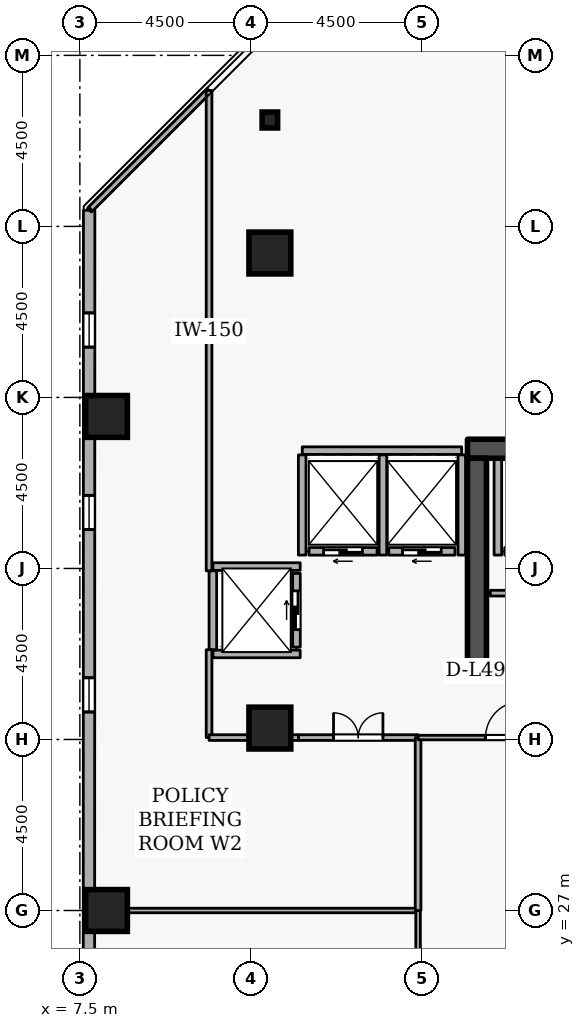
"""IFC4 building model, lengths in metres.
Left out: names, types, materials, properties, quantities, classifications, styles, units other than length and angle.
Written with IfcOpenShell. Run it as: python <this file> out.ifc"""

import sys

from ifc_helpers import new_model, si_unit, direction, frame, frame_2d, origin, origin_2d, place, context, subcontext, project, spatial, rectangle, i_section, extrude, element, fill, save


model = new_model("IFC4")
c1 = context("Model", 3, precision=1e-05, world=origin(), true_north=direction((0.0, 1.0)))
c2 = subcontext(c1, "Body", "Model", "MODEL_VIEW")
j1 = project(units=[si_unit("LENGTHUNIT", "METRE"), si_unit("PLANEANGLEUNIT", "RADIAN")], contexts=[c1])
p1 = place(None, origin())
s1 = spatial("IfcSite", under=j1, at=p1, CompositionType="ELEMENT")
p2 = place(p1, origin())
s2 = spatial("IfcBuilding", under=s1, at=p2, CompositionType="ELEMENT")
p3 = place(p2, frame((0.0, 0.0, 185.7)))
s3 = spatial("IfcBuildingStorey", under=s2, at=p3, CompositionType="ELEMENT", Elevation=185.7)
p4 = place(p3, frame((17.7, 39.15, 0.0), z_axis=(0.0, 0.0, 1.0), x_axis=(1.0, 0.0, 0.0)))
e1 = element("IfcWall", 1, at=p4, inside=s3, PredefinedType="SHEAR", context=c2, shape_type="SweptSolid", body=[
    extrude(rectangle(XDim=15.6, YDim=0.5, at=frame_2d((7.8, 0.0))), origin(), (0.0, 0.0, 1.0), 3.6),
])
p5 = place(p3, frame((17.95, 33.1, 0.0), z_axis=(0.0, 0.0, 1.0), x_axis=(0.0, 1.0, 0.0)))
e2 = element("IfcWall", 2, at=p5, inside=s3, PredefinedType="SHEAR", context=c2, shape_type="SweptSolid", body=[
    extrude(rectangle(XDim=5.8, YDim=0.5, at=frame_2d((2.9, 0.0))), origin(), (0.0, 0.0, 1.0), 3.6),
])
for number, where, z_axis, x_axis in (
    (3, (12.5, 44.3, 0.0), (0.0, 0.0, 1.0), (1.0, 0.0, 0.0)),
    (4, (8.2, 27.0, 0.0), (0.0, 0.0, 1.0), (1.0, 0.0, 0.0)),
    (5, (8.2, 40.0, 0.0), (0.0, 0.0, 1.0), (1.0, 0.0, 0.0)),
    (6, (12.5, 31.8, 0.0), (0.0, 0.0, 1.0), (1.0, 0.0, 0.0)),
):
    element("IfcColumn", number, at=place(p3, frame(where, z_axis=z_axis, x_axis=x_axis)), inside=s3, PredefinedType="COLUMN", context=c2, shape_type="SweptSolid", body=[
        extrude(rectangle(XDim=1.1, YDim=1.1, at=origin_2d()), origin(), (0.0, 0.0, 1.0), 3.6),
    ])
p6 = place(p3, frame((12.5, 47.8, 0.0), z_axis=(0.0, 0.0, 1.0), x_axis=(1.0, 0.0, 0.0)))
e7 = element("IfcColumn", 7, at=p6, inside=s3, PredefinedType="COLUMN", context=c2, shape_type="SweptSolid", body=[
    extrude(i_section(OverallWidth=0.407, OverallDepth=0.419, WebThickness=0.031, FlangeThickness=0.049, FilletRadius=0.015, at=origin_2d()), origin(), (0.0, 0.0, 1.0), 3.6),
])
p7 = place(p3, frame((7.744, 45.424, 0.0), z_axis=(0.0, 0.0, 1.0), x_axis=(-0.000268805477, -0.999999963872, 0.0)))
e8 = element("IfcWall", 8, at=p7, inside=s3, PredefinedType="STANDARD", context=c2, shape_type="SweptSolid", body=[
    extrude(rectangle(XDim=33.605, YDim=0.3, at=frame_2d((16.802, 0.0))), origin(), (0.0, 0.0, 1.0), 2.7),
])
p8 = place(p7, frame((2.7, 0.0, 0.72)))
e9 = element("IfcOpeningElement", 9, at=p8, cuts=e8, PredefinedType="OPENING", context=c2, shape_type="SweptSolid", body=[
    extrude(rectangle(XDim=0.9, YDim=1.75, at=frame_2d((0.45, 0.875))), frame((0.0, 0.16, 0.0), z_axis=(0.0, -1.0, 0.0), x_axis=(1.0, 0.0, 0.0)), (0.0, 0.0, 1.0), 0.32),
])
p9 = place(p7, frame((7.5, 0.0, 0.72)))
e10 = element("IfcOpeningElement", 10, at=p9, cuts=e8, PredefinedType="OPENING", context=c2, shape_type="SweptSolid", body=[
    extrude(rectangle(XDim=0.9, YDim=1.75, at=frame_2d((0.45, 0.875))), frame((0.0, 0.16, 0.0), z_axis=(0.0, -1.0, 0.0), x_axis=(1.0, 0.0, 0.0)), (0.0, 0.0, 1.0), 0.32),
])
p10 = place(p7, frame((12.3, 0.0, 0.72)))
e11 = element("IfcOpeningElement", 11, at=p10, cuts=e8, PredefinedType="OPENING", context=c2, shape_type="SweptSolid", body=[
    extrude(rectangle(XDim=0.9, YDim=1.75, at=frame_2d((0.45, 0.875))), frame((0.0, 0.16, 0.0), z_axis=(0.0, -1.0, 0.0), x_axis=(1.0, 0.0, 0.0)), (0.0, 0.0, 1.0), 0.32),
])
p11 = place(p7, frame((21.9, 0.0, 0.72)))
e12 = element("IfcOpeningElement", 12, at=p11, cuts=e8, PredefinedType="OPENING", context=c2, shape_type="SweptSolid", body=[
    extrude(rectangle(XDim=0.9, YDim=1.75, at=frame_2d((0.45, 0.875))), frame((0.0, 0.16, 0.0), z_axis=(0.0, -1.0, 0.0), x_axis=(1.0, 0.0, 0.0)), (0.0, 0.0, 1.0), 0.32),
])
p12 = place(p7, frame((26.7, 0.0, 0.72)))
e13 = element("IfcOpeningElement", 13, at=p12, cuts=e8, PredefinedType="OPENING", context=c2, shape_type="SweptSolid", body=[
    extrude(rectangle(XDim=0.9, YDim=1.75, at=frame_2d((0.45, 0.875))), frame((0.0, 0.16, 0.0), z_axis=(0.0, -1.0, 0.0), x_axis=(1.0, 0.0, 0.0)), (0.0, 0.0, 1.0), 0.32),
])
p13 = place(p3, frame((20.62, 36.45, 0.0), z_axis=(0.0, 0.0, 1.0), x_axis=(-1.0, 0.0, 0.0)))
e14 = element("IfcWall", 14, at=p13, inside=s3, PredefinedType="STANDARD", context=c2, shape_type="SweptSolid", body=[
    extrude(rectangle(XDim=1.94, YDim=0.2, at=frame_2d((0.97, 0.0))), origin(), (0.0, 0.0, 1.0), 3.34),
])
p14 = place(p13, frame((0.46, 0.0, 0.0)))
e15 = element("IfcOpeningElement", 15, at=p14, cuts=e14, PredefinedType="OPENING", context=c2, shape_type="SweptSolid", body=[
    extrude(rectangle(XDim=1.02, YDim=2.06, at=frame_2d((0.51, 1.03))), frame((0.0, 0.11, 0.0), z_axis=(0.0, -1.0, 0.0), x_axis=(1.0, 0.0, 0.0)), (0.0, 0.0, 1.0), 0.22),
])
p15 = place(p3, frame((17.37, 36.45, 0.0), z_axis=(0.0, 0.0, 1.0), x_axis=(-1.0, 0.0, 0.0)))
e16 = element("IfcWall", 16, at=p15, inside=s3, PredefinedType="STANDARD", context=c2, shape_type="SweptSolid", body=[
    extrude(rectangle(XDim=1.74, YDim=0.2, at=frame_2d((0.87, 0.0))), origin(), (0.0, 0.0, 1.0), 3.34),
])
p16 = place(p15, frame((0.36, 0.0, 0.0)))
e17 = element("IfcOpeningElement", 17, at=p16, cuts=e16, PredefinedType="OPENING", context=c2, shape_type="SweptSolid", body=[
    extrude(rectangle(XDim=1.02, YDim=2.06, at=frame_2d((0.51, 1.03))), frame((0.0, 0.11, 0.0), z_axis=(0.0, -1.0, 0.0), x_axis=(1.0, 0.0, 0.0)), (0.0, 0.0, 1.0), 0.22),
])
p17 = place(p3, frame((15.32, 36.45, 0.0), z_axis=(0.0, 0.0, 1.0), x_axis=(-1.0, 0.0, 0.0)))
e18 = element("IfcWall", 18, at=p17, inside=s3, PredefinedType="STANDARD", context=c2, shape_type="SweptSolid", body=[
    extrude(rectangle(XDim=1.79, YDim=0.2, at=frame_2d((0.895, 0.0))), origin(), (0.0, 0.0, 1.0), 3.34),
])
p18 = place(p17, frame((0.385, 0.0, 0.0)))
e19 = element("IfcOpeningElement", 19, at=p18, cuts=e18, PredefinedType="OPENING", context=c2, shape_type="SweptSolid", body=[
    extrude(rectangle(XDim=1.02, YDim=2.06, at=frame_2d((0.51, 1.03))), frame((0.0, 0.11, 0.0), z_axis=(0.0, -1.0, 0.0), x_axis=(1.0, 0.0, 0.0)), (0.0, 0.0, 1.0), 0.22),
])
p19 = place(p3, frame((13.2, 33.93, 0.0), z_axis=(0.0, 0.0, 1.0), x_axis=(0.0, 1.0, 0.0)))
e20 = element("IfcWall", 20, at=p19, inside=s3, PredefinedType="STANDARD", context=c2, shape_type="SweptSolid", body=[
    extrude(rectangle(XDim=1.94, YDim=0.2, at=frame_2d((0.97, 0.0))), origin(), (0.0, 0.0, 1.0), 3.34),
])
p20 = place(p19, frame((0.46, 0.0, 0.0)))
e21 = element("IfcOpeningElement", 21, at=p20, cuts=e20, PredefinedType="OPENING", context=c2, shape_type="SweptSolid", body=[
    extrude(rectangle(XDim=1.02, YDim=2.06, at=frame_2d((0.51, 1.03))), frame((0.0, 0.11, 0.0), z_axis=(0.0, -1.0, 0.0), x_axis=(1.0, 0.0, 0.0)), (0.0, 0.0, 1.0), 0.22),
])
p21 = place(p3, frame((18.5, 36.352, 0.0), z_axis=(0.0, 0.0, 1.0), x_axis=(0.0, 1.0, 0.0)))
e22 = element("IfcWall", 22, at=p21, inside=s3, PredefinedType="STANDARD", context=c2, shape_type="SweptSolid", body=[
    extrude(rectangle(XDim=2.536, YDim=0.2, at=frame_2d((1.268, 0.0))), origin(), (0.0, 0.0, 1.0), 3.34),
])
p22 = place(p3, frame((13.352, 39.1, 0.0), z_axis=(0.0, 0.0, 1.0), x_axis=(1.0, 0.0, 0.0)))
e23 = element("IfcWall", 23, at=p22, inside=s3, PredefinedType="STANDARD", context=c2, shape_type="SweptSolid", body=[
    extrude(rectangle(XDim=4.196, YDim=0.2, at=frame_2d((2.098, 0.0))), origin(), (0.0, 0.0, 1.0), 3.34),
])
p23 = place(p3, frame((17.55, 36.352, 0.0), z_axis=(0.0, 0.0, 1.0), x_axis=(0.0, 1.0, 0.0)))
e24 = element("IfcWall", 24, at=p23, inside=s3, PredefinedType="STANDARD", context=c2, shape_type="SweptSolid", body=[
    extrude(rectangle(XDim=2.636, YDim=0.2, at=frame_2d((1.318, 0.0))), origin(), (0.0, 0.0, 1.0), 2.545),
])
for number, where, z_axis, x_axis in (
    (25, (15.475, 36.352, 0.0), (0.0, 0.0, 1.0), (0.0, 1.0, 0.0)),
    (26, (13.35, 36.352, 0.0), (0.0, 0.0, 1.0), (0.0, 1.0, 0.0)),
):
    element("IfcWall", number, at=place(p3, frame(where, z_axis=z_axis, x_axis=x_axis)), inside=s3, PredefinedType="STANDARD", context=c2, shape_type="SweptSolid", body=[
        extrude(rectangle(XDim=2.636, YDim=0.2, at=frame_2d((1.318, 0.0))), origin(), (0.0, 0.0, 1.0), 3.34),
    ])
for number, where, z_axis, x_axis in (
    (27, (11.002, 36.05, 0.0), (0.0, 0.0, 1.0), (1.0, 0.0, 0.0)),
    (28, (11.002, 33.75, 0.0), (0.0, 0.0, 1.0), (1.0, 0.0, 0.0)),
):
    element("IfcWall", number, at=place(p3, frame(where, z_axis=z_axis, x_axis=x_axis)), inside=s3, PredefinedType="STANDARD", context=c2, shape_type="SweptSolid", body=[
        extrude(rectangle(XDim=2.296, YDim=0.2, at=frame_2d((1.148, 0.0))), origin(), (0.0, 0.0, 1.0), 3.34),
    ])
p24 = place(p3, frame((11.0, 33.862, 0.0), z_axis=(0.0, 0.0, 1.0), x_axis=(0.0, 1.0, 0.0)))
e29 = element("IfcWall", 29, at=p24, inside=s3, PredefinedType="STANDARD", context=c2, shape_type="SweptSolid", body=[
    extrude(rectangle(XDim=2.076, YDim=0.2, at=frame_2d((1.038, 0.0))), origin(), (0.0, 0.0, 1.0), 3.34),
])
p25 = place(p3, frame((18.3, 33.3, 0.0), z_axis=(0.0, 0.0, 1.0), x_axis=(1.0, 0.0, 0.0)))
e30 = element("IfcWall", 30, at=p25, inside=s3, PredefinedType="PARTITIONING", context=c2, shape_type="SweptSolid", body=[
    extrude(rectangle(XDim=2.25, YDim=0.15, at=frame_2d((1.125, 0.0))), origin(), (0.0, 0.0, 1.0), 3.34),
])
p26 = place(p25, frame((0.665, 0.0, 0.0)))
e31 = element("IfcOpeningElement", 31, at=p26, cuts=e30, PredefinedType="OPENING", context=c2, shape_type="SweptSolid", body=[
    extrude(rectangle(XDim=0.92, YDim=2.08, at=frame_2d((0.46, 1.04))), frame((0.0, 0.085, 0.0), z_axis=(0.0, -1.0, 0.0), x_axis=(1.0, 0.0, 0.0)), (0.0, 0.0, 1.0), 0.17),
])
p27 = place(p3, frame((20.55, 35.35, 0.0), z_axis=(0.0, 0.0, 1.0), x_axis=(-1.0, 0.0, 0.0)))
e32 = element("IfcWall", 32, at=p27, inside=s3, PredefinedType="PARTITIONING", context=c2, shape_type="SweptSolid", body=[
    extrude(rectangle(XDim=2.25, YDim=0.15, at=frame_2d((1.125, 0.0))), origin(), (0.0, 0.0, 1.0), 3.34),
])
p28 = place(p3, frame((7.78, 27.0, 0.0), z_axis=(0.0, 0.0, 1.0), x_axis=(1.0, 0.0, 0.0)))
e33 = element("IfcWall", 33, at=p28, inside=s3, PredefinedType="PARTITIONING", context=c2, shape_type="SweptSolid", body=[
    extrude(rectangle(XDim=8.62, YDim=0.12, at=frame_2d((4.31, 0.0))), origin(), (0.0, 0.0, 1.0), 2.878),
])
p29 = place(p3, frame((16.4, 27.0, 0.0), z_axis=(0.0, 0.0, 1.0), x_axis=(0.0, -1.0, 0.0)))
e34 = element("IfcWall", 34, at=p29, inside=s3, PredefinedType="PARTITIONING", context=c2, shape_type="SweptSolid", body=[
    extrude(rectangle(XDim=4.55, YDim=0.12, at=frame_2d((2.275, 0.0))), origin(), (0.0, 0.0, 1.0), 3.34),
])
p30 = place(p3, frame((13.25, 31.55, 0.0), z_axis=(0.0, 0.0, 1.0), x_axis=(1.0, 0.0, 0.0)))
e35 = element("IfcWall", 35, at=p30, inside=s3, PredefinedType="PARTITIONING", context=c2, shape_type="SweptSolid", body=[
    extrude(rectangle(XDim=3.15, YDim=0.15, at=frame_2d((1.575, 0.0))), origin(), (0.0, 0.0, 1.0), 3.34),
])
p31 = place(p30, frame((0.925, 0.0, 0.0)))
e36 = element("IfcOpeningElement", 36, at=p31, cuts=e35, PredefinedType="OPENING", context=c2, shape_type="SweptSolid", body=[
    extrude(rectangle(XDim=1.3, YDim=2.12, at=frame_2d((0.65, 1.06))), frame((0.0, 0.085, 0.0), z_axis=(0.0, -1.0, 0.0), x_axis=(1.0, 0.0, 0.0)), (0.0, 0.0, 1.0), 0.17),
])
p32 = place(p3, frame((16.4, 31.55, 0.0), z_axis=(0.0, 0.0, 1.0), x_axis=(0.0, -1.0, 0.0)))
e37 = element("IfcWall", 37, at=p32, inside=s3, PredefinedType="PARTITIONING", context=c2, shape_type="SweptSolid", body=[
    extrude(rectangle(XDim=4.55, YDim=0.15, at=frame_2d((2.275, 0.0))), origin(), (0.0, 0.0, 1.0), 3.34),
])
p33 = place(p3, frame((7.78, 45.456, 0.0), z_axis=(0.0, 0.0, 1.0), x_axis=(0.707079114978, 0.707134446312, 0.0)))
e38 = element("IfcWall", 38, at=p33, inside=s3, PredefinedType="PARTITIONING", context=c2, shape_type="SweptSolid", body=[
    extrude(rectangle(XDim=4.412, YDim=0.15, at=frame_2d((2.206, 0.0))), origin(), (0.0, 0.0, 1.0), 3.34),
])
p34 = place(p3, frame((10.9, 48.576, 0.0), z_axis=(0.0, 0.0, 1.0), x_axis=(0.0, -1.0, 0.0)))
e39 = element("IfcWall", 39, at=p34, inside=s3, PredefinedType="PARTITIONING", context=c2, shape_type="SweptSolid", body=[
    extrude(rectangle(XDim=12.638, YDim=0.15, at=frame_2d((6.319, 0.0))), origin(), (0.0, 0.0, 1.0), 3.34),
])
p35 = place(p3, frame((10.9, 33.862, 0.0), z_axis=(0.0, 0.0, 1.0), x_axis=(0.0, -1.0, 0.0)))
e40 = element("IfcWall", 40, at=p35, inside=s3, PredefinedType="PARTITIONING", context=c2, shape_type="SweptSolid", body=[
    extrude(rectangle(XDim=2.312, YDim=0.15, at=frame_2d((1.156, 0.0))), origin(), (0.0, 0.0, 1.0), 3.34),
])
p36 = place(p3, frame((10.9, 31.55, 0.0), z_axis=(0.0, 0.0, 1.0), x_axis=(1.0, 0.0, 0.0)))
e41 = element("IfcWall", 41, at=p36, inside=s3, PredefinedType="PARTITIONING", context=c2, shape_type="SweptSolid", body=[
    extrude(rectangle(XDim=2.35, YDim=0.15, at=frame_2d((1.175, 0.0))), origin(), (0.0, 0.0, 1.0), 3.34),
])
p37 = place(p3, frame((16.4, 31.55, 0.0), z_axis=(0.0, 0.0, 1.0), x_axis=(1.0, 0.0, 0.0)))
e42 = element("IfcWall", 42, at=p37, inside=s3, PredefinedType="PARTITIONING", context=c2, shape_type="SweptSolid", body=[
    extrude(rectangle(XDim=4.5, YDim=0.12, at=frame_2d((2.25, 0.0))), origin(), (0.0, 0.0, 1.0), 3.34),
])
p38 = place(p37, frame((1.775, 0.0, 0.0)))
e43 = element("IfcOpeningElement", 43, at=p38, cuts=e42, PredefinedType="OPENING", context=c2, shape_type="SweptSolid", body=[
    extrude(rectangle(XDim=0.95, YDim=2.1, at=frame_2d((0.475, 1.05))), frame((0.0, 0.07, 0.0), z_axis=(0.0, -1.0, 0.0), x_axis=(1.0, 0.0, 0.0)), (0.0, 0.0, 1.0), 0.14),
])
p39 = place(p8, origin())
e44 = element("IfcWindow", 44, at=p39, inside=s3, PartitioningType="SINGLE_PANEL", PredefinedType="WINDOW", context=c2, shape_type="SweptSolid", body=[
    extrude(rectangle(XDim=0.9, YDim=1.75, at=frame_2d((0.45, 0.875))), frame((0.0, 0.03, 0.0), z_axis=(0.0, -1.0, 0.0), x_axis=(1.0, 0.0, 0.0)), (0.0, 0.0, 1.0), 0.06),
])
fill(e9, e44)
p40 = place(p9, origin())
e45 = element("IfcWindow", 45, at=p40, inside=s3, PartitioningType="SINGLE_PANEL", PredefinedType="WINDOW", context=c2, shape_type="SweptSolid", body=[
    extrude(rectangle(XDim=0.9, YDim=1.75, at=frame_2d((0.45, 0.875))), frame((0.0, 0.03, 0.0), z_axis=(0.0, -1.0, 0.0), x_axis=(1.0, 0.0, 0.0)), (0.0, 0.0, 1.0), 0.06),
])
fill(e10, e45)
p41 = place(p10, origin())
e46 = element("IfcWindow", 46, at=p41, inside=s3, PartitioningType="SINGLE_PANEL", PredefinedType="WINDOW", context=c2, shape_type="SweptSolid", body=[
    extrude(rectangle(XDim=0.9, YDim=1.75, at=frame_2d((0.45, 0.875))), frame((0.0, 0.03, 0.0), z_axis=(0.0, -1.0, 0.0), x_axis=(1.0, 0.0, 0.0)), (0.0, 0.0, 1.0), 0.06),
])
fill(e11, e46)
p42 = place(p16, origin())
e47 = element("IfcDoor", 47, at=p42, inside=s3, OperationType="SLIDING_TO_LEFT", PredefinedType="DOOR", context=c2, shape_type="SweptSolid", body=[
    extrude(rectangle(XDim=1.02, YDim=2.06, at=frame_2d((0.51, 1.03))), frame((0.0, 0.025, 0.0), z_axis=(0.0, -1.0, 0.0), x_axis=(1.0, 0.0, 0.0)), (0.0, 0.0, 1.0), 0.05),
])
fill(e17, e47)
p43 = place(p18, origin())
e48 = element("IfcDoor", 48, at=p43, inside=s3, OperationType="SLIDING_TO_LEFT", PredefinedType="DOOR", context=c2, shape_type="SweptSolid", body=[
    extrude(rectangle(XDim=1.02, YDim=2.06, at=frame_2d((0.51, 1.03))), frame((0.0, 0.025, 0.0), z_axis=(0.0, -1.0, 0.0), x_axis=(1.0, 0.0, 0.0)), (0.0, 0.0, 1.0), 0.05),
])
fill(e19, e48)
p44 = place(p20, origin())
e49 = element("IfcDoor", 49, at=p44, inside=s3, OperationType="SLIDING_TO_LEFT", PredefinedType="DOOR", context=c2, shape_type="SweptSolid", body=[
    extrude(rectangle(XDim=1.02, YDim=2.06, at=frame_2d((0.51, 1.03))), frame((0.0, 0.025, 0.0), z_axis=(0.0, -1.0, 0.0), x_axis=(1.0, 0.0, 0.0)), (0.0, 0.0, 1.0), 0.05),
])
fill(e21, e49)
p45 = place(p31, origin())
e50 = element("IfcDoor", 50, at=p45, inside=s3, OperationType="DOUBLE_DOOR_SINGLE_SWING", PredefinedType="DOOR", context=c2, shape_type="SweptSolid", body=[
    extrude(rectangle(XDim=1.3, YDim=2.12, at=frame_2d((0.65, 1.06))), frame((0.0, 0.025, 0.0), z_axis=(0.0, -1.0, 0.0), x_axis=(1.0, 0.0, 0.0)), (0.0, 0.0, 1.0), 0.05),
])
fill(e36, e50)
p46 = place(p38, origin())
e51 = element("IfcDoor", 51, at=p46, inside=s3, OperationType="SINGLE_SWING_RIGHT", PredefinedType="DOOR", context=c2, shape_type="SweptSolid", body=[
    extrude(rectangle(XDim=0.95, YDim=2.1, at=frame_2d((0.475, 1.05))), frame((0.0, 0.025, 0.0), z_axis=(0.0, -1.0, 0.0), x_axis=(1.0, 0.0, 0.0)), (0.0, 0.0, 1.0), 0.05),
])
fill(e43, e51)
save(model, sys.argv[1])
